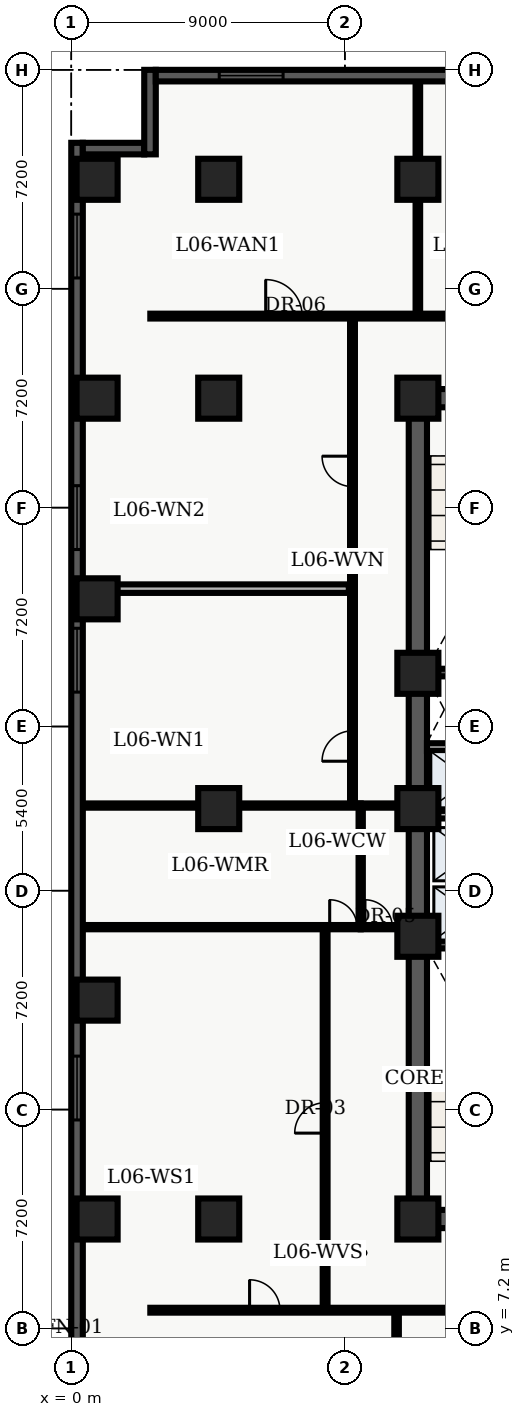
"""IFC4 building model, lengths in metres.
Left out: names, types, materials, properties, quantities, classifications, styles, units other than length and angle.
Written with IfcOpenShell. Run it as: python <this file> out.ifc"""

import sys

from ifc_helpers import new_model, entity, si_unit, converted_unit, direction, frame, origin_with_axes, origin_2d_with_axis, place, context, subcontext, project, spatial, polyline, rectangle, outline, extrude, element, fill, save


model = new_model("IFC4")
c1 = context("Model", 3, precision=1e-05, world=origin_with_axes(), true_north=direction((0.0, 1.0)))
c2 = subcontext(c1, "Body", "Model", "MODEL_VIEW")
j1 = project(units=[si_unit("LENGTHUNIT", "METRE"), converted_unit("PLANEANGLEUNIT", "DEGREE", entity("IfcPlaneAngleMeasure", 0.017), si_unit("PLANEANGLEUNIT", "RADIAN"), dimensions=[0, 0, 0, 0, 0, 0, 0])], contexts=[c1])
p1 = place(None, origin_with_axes())
s1 = spatial("IfcSite", under=j1, at=p1, CompositionType="ELEMENT")
p2 = place(p1, origin_with_axes())
s2 = spatial("IfcBuilding", under=s1, at=p2, CompositionType="ELEMENT")
p3 = place(p2, frame((0.0, 0.0, 28.8), z_axis=(0.0, 0.0, 1.0), x_axis=(1.0, 0.0, 0.0)))
s3 = spatial("IfcBuildingStorey", under=s2, at=p3, CompositionType="ELEMENT", Elevation=28.8)
p4 = place(p3, frame((11.4, 10.8, 0.0), z_axis=(0.0, 0.0, 1.0), x_axis=(0.0, 1.0, 0.0)))
e1 = element("IfcWall", 1, at=p4, inside=s3, PredefinedType="SHEAR", context=c2, shape_type="SweptSolid", body=[
    extrude(outline(polyline([(0.0, -0.3), (27.0, -0.3), (27.0, 0.3), (0.0, 0.3), (0.0, -0.3)])), origin_with_axes(), (0.0, 0.0, 1.0), 3.66),
])
p5 = place(p3, frame((11.4, 10.8, 0.0), z_axis=(0.0, 0.0, 1.0), x_axis=(1.0, 0.0, 0.0)))
e2 = element("IfcWall", 2, at=p5, inside=s3, PredefinedType="SHEAR", context=c2, shape_type="SweptSolid", body=[
    extrude(outline(polyline([(0.0, -0.3), (7.2, -0.3), (7.2, 0.3), (0.0, 0.3), (0.0, -0.3)])), origin_with_axes(), (0.0, 0.0, 1.0), 3.66),
])
p6 = place(p5, frame((2.625, 0.0, 0.0), z_axis=(0.0, 0.0, 1.0), x_axis=(1.0, 0.0, 0.0)))
e3 = element("IfcOpeningElement", 3, at=p6, cuts=e2, PredefinedType="OPENING", context=c2, shape_type="SweptSolid", body=[
    extrude(rectangle(XDim=1.05, YDim=0.62, at=origin_2d_with_axis()), origin_with_axes(), (0.0, 0.0, 1.0), 2.15),
])
p7 = place(p3, frame((11.4, 37.8, 0.0), z_axis=(0.0, 0.0, 1.0), x_axis=(1.0, 0.0, 0.0)))
e4 = element("IfcWall", 4, at=p7, inside=s3, PredefinedType="SHEAR", context=c2, shape_type="SweptSolid", body=[
    extrude(outline(polyline([(0.0, -0.3), (7.2, -0.3), (7.2, 0.3), (0.0, 0.3), (0.0, -0.3)])), origin_with_axes(), (0.0, 0.0, 1.0), 3.66),
])
p8 = place(p7, frame((2.625, 0.0, 0.0), z_axis=(0.0, 0.0, 1.0), x_axis=(1.0, 0.0, 0.0)))
e5 = element("IfcOpeningElement", 5, at=p8, cuts=e4, PredefinedType="OPENING", context=c2, shape_type="SweptSolid", body=[
    extrude(rectangle(XDim=1.05, YDim=0.62, at=origin_2d_with_axis()), origin_with_axes(), (0.0, 0.0, 1.0), 2.15),
])
for number, where, z_axis, x_axis in (
    (6, (11.7, 19.825, 0.0), (0.0, 0.0, 1.0), (1.0, 0.0, 0.0)),
    (7, (11.7, 28.775, 0.0), (0.0, 0.0, 1.0), (1.0, 0.0, 0.0)),
):
    element("IfcWall", number, at=place(p3, frame(where, z_axis=z_axis, x_axis=x_axis)), inside=s3, PredefinedType="SHEAR", context=c2, shape_type="SweptSolid", body=[
        extrude(outline(polyline([(0.0, -0.125), (6.6, -0.125), (6.6, 0.125), (0.0, 0.125), (0.0, -0.125)])), origin_with_axes(), (0.0, 0.0, 1.0), 3.66),
    ])
p9 = place(p3, frame((11.7, 24.1, 0.0), z_axis=(0.0, 0.0, 1.0), x_axis=(1.0, 0.0, 0.0)))
e8 = element("IfcWall", 8, at=p9, inside=s3, PredefinedType="SOLIDWALL", context=c2, shape_type="SweptSolid", body=[
    extrude(outline(polyline([(0.0, -0.125), (6.6, -0.125), (6.6, 0.125), (0.0, 0.125), (0.0, -0.125)])), origin_with_axes(), (0.0, 0.0, 1.0), 2.7),
])
p10 = place(p9, frame((3.75, 0.0, 0.0), z_axis=(0.0, 0.0, 1.0), x_axis=(1.0, 0.0, 0.0)))
e9 = element("IfcOpeningElement", 9, at=p10, cuts=e8, PredefinedType="OPENING", context=c2, shape_type="SweptSolid", body=[
    extrude(rectangle(XDim=0.9, YDim=0.27, at=origin_2d_with_axis()), origin_with_axes(), (0.0, 0.0, 1.0), 2.15),
])
p11 = place(p3, frame((11.7, 26.325, 0.0), z_axis=(0.0, 0.0, 1.0), x_axis=(1.0, 0.0, 0.0)))
e10 = element("IfcWall", 10, at=p11, inside=s3, PredefinedType="SOLIDWALL", context=c2, shape_type="SweptSolid", body=[
    extrude(outline(polyline([(0.0, -0.125), (6.6, -0.125), (6.6, 0.125), (0.0, 0.125), (0.0, -0.125)])), origin_with_axes(), (0.0, 0.0, 1.0), 2.7),
])
p12 = place(p11, frame((3.5, 0.0, 0.0), z_axis=(0.0, 0.0, 1.0), x_axis=(1.0, 0.0, 0.0)))
e11 = element("IfcOpeningElement", 11, at=p12, cuts=e10, PredefinedType="OPENING", context=c2, shape_type="SweptSolid", body=[
    extrude(rectangle(XDim=0.9, YDim=0.27, at=origin_2d_with_axis()), origin_with_axes(), (0.0, 0.0, 1.0), 2.15),
])
for number, where, z_axis, x_axis in (
    (12, (11.4, 10.8, 0.0), (0.0, 0.0, 1.0), (1.0, 0.0, 0.0)),
    (13, (11.4, 20.1, 0.0), (0.0, 0.0, 1.0), (1.0, 0.0, 0.0)),
    (14, (11.4, 24.3, 0.0), (0.0, 0.0, 1.0), (1.0, 0.0, 0.0)),
    (15, (11.4, 28.75, 0.0), (0.0, 0.0, 1.0), (1.0, 0.0, 0.0)),
    (16, (11.4, 37.8, 0.0), (0.0, 0.0, 1.0), (1.0, 0.0, 0.0)),
    (17, (11.4, 45.0, 0.0), (0.0, 0.0, 1.0), (1.0, 0.0, 0.0)),
    (18, (4.85, 10.8, 0.0), (0.0, 0.0, 1.0), (1.0, 0.0, 0.0)),
    (19, (4.85, 24.3, 0.0), (0.0, 0.0, 1.0), (1.0, 0.0, 0.0)),
    (20, (4.85, 37.8, 0.0), (0.0, 0.0, 1.0), (1.0, 0.0, 0.0)),
    (21, (4.85, 45.0, 0.0), (0.0, 0.0, 1.0), (1.0, 0.0, 0.0)),
    (22, (0.85, 10.8, 0.0), (0.0, 0.0, 1.0), (1.0, 0.0, 0.0)),
    (23, (0.85, 18.0, 0.0), (0.0, 0.0, 1.0), (1.0, 0.0, 0.0)),
    (24, (0.85, 31.2, 0.0), (0.0, 0.0, 1.0), (1.0, 0.0, 0.0)),
    (25, (0.85, 37.8, 0.0), (0.0, 0.0, 1.0), (1.0, 0.0, 0.0)),
    (26, (0.85, 45.0, 0.0), (0.0, 0.0, 1.0), (1.0, 0.0, 0.0)),
):
    element("IfcColumn", number, at=place(p3, frame(where, z_axis=z_axis, x_axis=x_axis)), inside=s3, PredefinedType="COLUMN", context=c2, shape_type="SweptSolid", body=[
        extrude(rectangle(XDim=1.35, YDim=1.35, at=origin_2d_with_axis()), origin_with_axes(), (0.0, 0.0, 1.0), 3.9),
    ])
p13 = place(p3, frame((9.52, 20.4, 0.0), z_axis=(0.0, 0.0, 1.0), x_axis=(0.0, 1.0, 0.0)))
e27 = element("IfcWall", 27, at=p13, inside=s3, PredefinedType="PARTITIONING", context=c2, shape_type="SweptSolid", body=[
    extrude(outline(polyline([(0.0, -0.07), (4.0, -0.07), (4.0, 0.07), (0.0, 0.07), (0.0, -0.07)])), origin_with_axes(), (0.0, 0.0, 1.0), 2.7),
])
p14 = place(p3, frame((9.52, 20.4, 0.0), z_axis=(0.0, 0.0, 1.0), x_axis=(1.0, 0.0, 0.0)))
e28 = element("IfcWall", 28, at=p14, inside=s3, PredefinedType="PARTITIONING", context=c2, shape_type="SweptSolid", body=[
    extrude(outline(polyline([(0.0, -0.07), (1.58, -0.07), (1.58, 0.07), (0.0, 0.07), (0.0, -0.07)])), origin_with_axes(), (0.0, 0.0, 1.0), 2.7),
])
p15 = place(p14, frame((0.59, 0.0, 0.0), z_axis=(0.0, 0.0, 1.0), x_axis=(1.0, 0.0, 0.0)))
e29 = element("IfcOpeningElement", 29, at=p15, cuts=e28, PredefinedType="OPENING", context=c2, shape_type="SweptSolid", body=[
    extrude(rectangle(XDim=0.9, YDim=0.16, at=origin_2d_with_axis()), origin_with_axes(), (0.0, 0.0, 1.0), 2.15),
])
p16 = place(p3, frame((9.52, 24.4, 0.0), z_axis=(0.0, 0.0, 1.0), x_axis=(1.0, 0.0, 0.0)))
e30 = element("IfcWall", 30, at=p16, inside=s3, PredefinedType="PARTITIONING", context=c2, shape_type="SweptSolid", body=[
    extrude(outline(polyline([(0.0, -0.07), (1.58, -0.07), (1.58, 0.07), (0.0, 0.07), (0.0, -0.07)])), origin_with_axes(), (0.0, 0.0, 1.0), 2.7),
])
p17 = place(p3, frame((2.6, 7.8, 0.0), z_axis=(0.0, 0.0, 1.0), x_axis=(1.0, 0.0, 0.0)))
e31 = element("IfcWall", 31, at=p17, inside=s3, PredefinedType="PARTITIONING", context=c2, shape_type="SweptSolid", body=[
    extrude(outline(polyline([(0.0, -0.08), (18.55, -0.08), (18.55, 0.08), (0.0, 0.08), (0.0, -0.08)])), origin_with_axes(), (0.0, 0.0, 1.0), 2.7),
])
p18 = place(p17, frame((3.765, 0.0, 0.0), z_axis=(0.0, 0.0, 1.0), x_axis=(1.0, 0.0, 0.0)))
e32 = element("IfcOpeningElement", 32, at=p18, cuts=e31, PredefinedType="OPENING", context=c2, shape_type="SweptSolid", body=[
    extrude(rectangle(XDim=1.0, YDim=0.18, at=origin_2d_with_axis()), origin_with_axes(), (0.0, 0.0, 1.0), 2.15),
])
p19 = place(p17, frame((13.3, 0.0, 0.0), z_axis=(0.0, 0.0, 1.0), x_axis=(1.0, 0.0, 0.0)))
e33 = element("IfcOpeningElement", 33, at=p19, cuts=e31, PredefinedType="OPENING", context=c2, shape_type="SweptSolid", body=[
    extrude(rectangle(XDim=1.0, YDim=0.18, at=origin_2d_with_axis()), origin_with_axes(), (0.0, 0.0, 1.0), 2.15),
])
p20 = place(p3, frame((2.6, 40.5, 0.0), z_axis=(0.0, 0.0, 1.0), x_axis=(1.0, 0.0, 0.0)))
e34 = element("IfcWall", 34, at=p20, inside=s3, PredefinedType="PARTITIONING", context=c2, shape_type="SweptSolid", body=[
    extrude(outline(polyline([(0.0, -0.08), (18.65, -0.08), (18.65, 0.08), (0.0, 0.08), (0.0, -0.08)])), origin_with_axes(), (0.0, 0.0, 1.0), 2.7),
])
p21 = place(p20, frame((4.395, 0.0, 0.0), z_axis=(0.0, 0.0, 1.0), x_axis=(1.0, 0.0, 0.0)))
e35 = element("IfcOpeningElement", 35, at=p21, cuts=e34, PredefinedType="OPENING", context=c2, shape_type="SweptSolid", body=[
    extrude(rectangle(XDim=1.2, YDim=0.18, at=origin_2d_with_axis()), origin_with_axes(), (0.0, 0.0, 1.0), 2.2),
])
p22 = place(p20, frame((12.61, 0.0, 0.0), z_axis=(0.0, 0.0, 1.0), x_axis=(1.0, 0.0, 0.0)))
e36 = element("IfcOpeningElement", 36, at=p22, cuts=e34, PredefinedType="OPENING", context=c2, shape_type="SweptSolid", body=[
    extrude(rectangle(XDim=1.0, YDim=0.18, at=origin_2d_with_axis()), origin_with_axes(), (0.0, 0.0, 1.0), 2.15),
])
p23 = place(p3, frame((8.35, 7.8, 0.0), z_axis=(0.0, 0.0, 1.0), x_axis=(0.0, 1.0, 0.0)))
e37 = element("IfcWall", 37, at=p23, inside=s3, PredefinedType="PARTITIONING", context=c2, shape_type="SweptSolid", body=[
    extrude(outline(polyline([(0.0, -0.08), (12.6, -0.08), (12.6, 0.08), (0.0, 0.08), (0.0, -0.08)])), origin_with_axes(), (0.0, 0.0, 1.0), 2.7),
])
p24 = place(p23, frame((6.325, 0.0, 0.0), z_axis=(0.0, 0.0, 1.0), x_axis=(1.0, 0.0, 0.0)))
e38 = element("IfcOpeningElement", 38, at=p24, cuts=e37, PredefinedType="OPENING", context=c2, shape_type="SweptSolid", body=[
    extrude(rectangle(XDim=1.0, YDim=0.18, at=origin_2d_with_axis()), origin_with_axes(), (0.0, 0.0, 1.0), 2.15),
])
p25 = place(p3, frame((9.25, 24.4, 0.0), z_axis=(0.0, 0.0, 1.0), x_axis=(0.0, 1.0, 0.0)))
e39 = element("IfcWall", 39, at=p25, inside=s3, PredefinedType="PARTITIONING", context=c2, shape_type="SweptSolid", body=[
    extrude(outline(polyline([(0.0, -0.08), (16.1, -0.08), (16.1, 0.08), (0.0, 0.08), (0.0, -0.08)])), origin_with_axes(), (0.0, 0.0, 1.0), 2.7),
])
p26 = place(p25, frame((1.958, 0.0, 0.0), z_axis=(0.0, 0.0, 1.0), x_axis=(1.0, 0.0, 0.0)))
e40 = element("IfcOpeningElement", 40, at=p26, cuts=e39, PredefinedType="OPENING", context=c2, shape_type="SweptSolid", body=[
    extrude(rectangle(XDim=1.0, YDim=0.18, at=origin_2d_with_axis()), origin_with_axes(), (0.0, 0.0, 1.0), 2.15),
])
p27 = place(p25, frame((10.992, 0.0, 0.0), z_axis=(0.0, 0.0, 1.0), x_axis=(1.0, 0.0, 0.0)))
e41 = element("IfcOpeningElement", 41, at=p27, cuts=e39, PredefinedType="OPENING", context=c2, shape_type="SweptSolid", body=[
    extrude(rectangle(XDim=1.0, YDim=0.18, at=origin_2d_with_axis()), origin_with_axes(), (0.0, 0.0, 1.0), 2.15),
])
p28 = place(p3, frame((0.36, 20.4, 0.0), z_axis=(0.0, 0.0, 1.0), x_axis=(1.0, 0.0, 0.0)))
e42 = element("IfcWall", 42, at=p28, inside=s3, PredefinedType="PARTITIONING", context=c2, shape_type="SweptSolid", body=[
    extrude(outline(polyline([(0.0, -0.07), (9.16, -0.07), (9.16, 0.07), (0.0, 0.07), (0.0, -0.07)])), origin_with_axes(), (0.0, 0.0, 1.0), 2.7),
])
p29 = place(p28, frame((8.59, 0.0, 0.0), z_axis=(0.0, 0.0, 1.0), x_axis=(1.0, 0.0, 0.0)))
e43 = element("IfcOpeningElement", 43, at=p29, cuts=e42, PredefinedType="OPENING", context=c2, shape_type="SweptSolid", body=[
    extrude(rectangle(XDim=0.9, YDim=0.16, at=origin_2d_with_axis()), origin_with_axes(), (0.0, 0.0, 1.0), 2.15),
])
p30 = place(p3, frame((0.36, 24.4, 0.0), z_axis=(0.0, 0.0, 1.0), x_axis=(1.0, 0.0, 0.0)))
e44 = element("IfcWall", 44, at=p30, inside=s3, PredefinedType="PARTITIONING", context=c2, shape_type="SweptSolid", body=[
    extrude(outline(polyline([(0.0, -0.07), (9.16, -0.07), (9.16, 0.07), (0.0, 0.07), (0.0, -0.07)])), origin_with_axes(), (0.0, 0.0, 1.0), 2.7),
])
p31 = place(p3, frame((0.375, 31.535, 0.0), z_axis=(0.0, 0.0, 1.0), x_axis=(1.0, 0.0, 0.0)))
e45 = element("IfcWall", 45, at=p31, inside=s3, PredefinedType="PARTITIONING", context=c2, shape_type="SweptSolid", body=[
    extrude(outline(polyline([(0.0, -0.14), (8.755, -0.14), (8.755, 0.14), (0.0, 0.14), (0.0, -0.14)])), origin_with_axes(), (0.0, 0.0, 1.0), 2.7),
])
p32 = place(p3, frame((10.7, 0.36, 0.0), z_axis=(0.0, 0.0, 1.0), x_axis=(0.0, 1.0, 0.0)))
e46 = element("IfcWall", 46, at=p32, inside=s3, PredefinedType="PARTITIONING", context=c2, shape_type="SweptSolid", body=[
    extrude(outline(polyline([(0.0, -0.075), (7.34, -0.075), (7.34, 0.075), (0.0, 0.075), (0.0, -0.075)])), origin_with_axes(), (0.0, 0.0, 1.0), 2.7),
])
p33 = place(p3, frame((11.4, 40.6, 0.0), z_axis=(0.0, 0.0, 1.0), x_axis=(0.0, 1.0, 0.0)))
e47 = element("IfcWall", 47, at=p33, inside=s3, PredefinedType="PARTITIONING", context=c2, shape_type="SweptSolid", body=[
    extrude(outline(polyline([(0.0, -0.075), (7.64, -0.075), (7.64, 0.075), (0.0, 0.075), (0.0, -0.075)])), origin_with_axes(), (0.0, 0.0, 1.0), 2.7),
])
p34 = place(p3, frame((0.19, 2.78, 0.0), z_axis=(0.0, 0.0, 1.0), x_axis=(0.0, 1.0, 0.0)))
e48 = element("IfcWall", 48, at=p34, inside=s3, PredefinedType="SOLIDWALL", context=c2, shape_type="SweptSolid", body=[
    extrude(outline(polyline([(0.0, -0.19), (43.42, -0.19), (43.42, 0.19), (0.0, 0.19), (0.0, -0.19)])), origin_with_axes(), (0.0, 0.0, 1.0), 3.66),
])
p35 = place(p34, frame((2.946, 0.0, 0.45), z_axis=(0.0, 0.0, 1.0), x_axis=(1.0, 0.0, 0.0)))
e49 = element("IfcOpeningElement", 49, at=p35, cuts=e48, PredefinedType="OPENING", context=c2, shape_type="SweptSolid", body=[
    extrude(rectangle(XDim=2.1, YDim=0.4, at=origin_2d_with_axis()), origin_with_axes(), (0.0, 0.0, 1.0), 2.2),
])
p36 = place(p34, frame((12.328, 0.0, 0.45), z_axis=(0.0, 0.0, 1.0), x_axis=(1.0, 0.0, 0.0)))
e50 = element("IfcOpeningElement", 50, at=p36, cuts=e48, PredefinedType="OPENING", context=c2, shape_type="SweptSolid", body=[
    extrude(rectangle(XDim=2.1, YDim=0.4, at=origin_2d_with_axis()), origin_with_axes(), (0.0, 0.0, 1.0), 2.2),
])
p37 = place(p34, frame((26.401, 0.0, 0.45), z_axis=(0.0, 0.0, 1.0), x_axis=(1.0, 0.0, 0.0)))
e51 = element("IfcOpeningElement", 51, at=p37, cuts=e48, PredefinedType="OPENING", context=c2, shape_type="SweptSolid", body=[
    extrude(rectangle(XDim=2.1, YDim=0.4, at=origin_2d_with_axis()), origin_with_axes(), (0.0, 0.0, 1.0), 2.2),
])
p38 = place(p34, frame((31.092, 0.0, 0.45), z_axis=(0.0, 0.0, 1.0), x_axis=(1.0, 0.0, 0.0)))
e52 = element("IfcOpeningElement", 52, at=p38, cuts=e48, PredefinedType="OPENING", context=c2, shape_type="SweptSolid", body=[
    extrude(rectangle(XDim=2.1, YDim=0.4, at=origin_2d_with_axis()), origin_with_axes(), (0.0, 0.0, 1.0), 2.2),
])
p39 = place(p34, frame((40.024, 0.0, 0.45), z_axis=(0.0, 0.0, 1.0), x_axis=(1.0, 0.0, 0.0)))
e53 = element("IfcOpeningElement", 53, at=p39, cuts=e48, PredefinedType="OPENING", context=c2, shape_type="SweptSolid", body=[
    extrude(rectangle(XDim=2.1, YDim=0.4, at=origin_2d_with_axis()), origin_with_axes(), (0.0, 0.0, 1.0), 2.2),
])
p40 = place(p3, frame((0.38, 46.01, 0.0), z_axis=(0.0, 0.0, 1.0), x_axis=(1.0, 0.0, 0.0)))
e54 = element("IfcWall", 54, at=p40, inside=s3, PredefinedType="SOLIDWALL", context=c2, shape_type="SweptSolid", body=[
    extrude(outline(polyline([(0.0, -0.19), (2.02, -0.19), (2.02, 0.19), (0.0, 0.19), (0.0, -0.19)])), origin_with_axes(), (0.0, 0.0, 1.0), 3.66),
])
p41 = place(p3, frame((2.59, 45.82, 0.0), z_axis=(0.0, 0.0, 1.0), x_axis=(0.0, 1.0, 0.0)))
e55 = element("IfcWall", 55, at=p41, inside=s3, PredefinedType="SOLIDWALL", context=c2, shape_type="SweptSolid", body=[
    extrude(outline(polyline([(0.0, -0.19), (2.78, -0.19), (2.78, 0.19), (0.0, 0.19), (0.0, -0.19)])), origin_with_axes(), (0.0, 0.0, 1.0), 3.66),
])
p42 = place(p3, frame((2.78, 48.41, 0.0), z_axis=(0.0, 0.0, 1.0), x_axis=(1.0, 0.0, 0.0)))
e56 = element("IfcWall", 56, at=p42, inside=s3, PredefinedType="SOLIDWALL", context=c2, shape_type="SweptSolid", body=[
    extrude(outline(polyline([(0.0, -0.19), (16.42, -0.19), (16.42, 0.19), (0.0, 0.19), (0.0, -0.19)])), origin_with_axes(), (0.0, 0.0, 1.0), 3.66),
])
p43 = place(p42, frame((3.137, 0.0, 0.45), z_axis=(0.0, 0.0, 1.0), x_axis=(1.0, 0.0, 0.0)))
e57 = element("IfcOpeningElement", 57, at=p43, cuts=e56, PredefinedType="OPENING", context=c2, shape_type="SweptSolid", body=[
    extrude(rectangle(XDim=2.1, YDim=0.4, at=origin_2d_with_axis()), origin_with_axes(), (0.0, 0.0, 1.0), 2.2),
])
p44 = place(p42, frame((13.283, 0.0, 0.45), z_axis=(0.0, 0.0, 1.0), x_axis=(1.0, 0.0, 0.0)))
e58 = element("IfcOpeningElement", 58, at=p44, cuts=e56, PredefinedType="OPENING", context=c2, shape_type="SweptSolid", body=[
    extrude(rectangle(XDim=2.1, YDim=0.4, at=origin_2d_with_axis()), origin_with_axes(), (0.0, 0.0, 1.0), 2.2),
])
p45 = place(p14, frame((0.59, 0.0, 0.0), z_axis=(0.0, 0.0, 1.0), x_axis=(1.0, 0.0, 0.0)))
e59 = element("IfcDoor", 59, at=p45, inside=s3, OperationType="SINGLE_SWING_LEFT", PredefinedType="DOOR", context=c2, shape_type="SweptSolid", body=[
    extrude(rectangle(XDim=0.9, YDim=0.084, at=origin_2d_with_axis()), origin_with_axes(), (0.0, 0.0, 1.0), 2.15),
])
fill(e29, e59)
p46 = place(p28, frame((8.59, 0.0, 0.0), z_axis=(0.0, 0.0, 1.0), x_axis=(1.0, 0.0, 0.0)))
e60 = element("IfcDoor", 60, at=p46, inside=s3, OperationType="SINGLE_SWING_LEFT", PredefinedType="DOOR", context=c2, shape_type="SweptSolid", body=[
    extrude(rectangle(XDim=0.9, YDim=0.084, at=origin_2d_with_axis()), origin_with_axes(), (0.0, 0.0, 1.0), 2.15),
])
fill(e43, e60)
p47 = place(p23, frame((6.325, 0.0, 0.0), z_axis=(0.0, 0.0, 1.0), x_axis=(1.0, 0.0, 0.0)))
e61 = element("IfcDoor", 61, at=p47, inside=s3, OperationType="SINGLE_SWING_LEFT", PredefinedType="DOOR", context=c2, shape_type="SweptSolid", body=[
    extrude(rectangle(XDim=1.0, YDim=0.09, at=origin_2d_with_axis()), origin_with_axes(), (0.0, 0.0, 1.0), 2.15),
])
fill(e38, e61)
p48 = place(p25, frame((1.958, 0.0, 0.0), z_axis=(0.0, 0.0, 1.0), x_axis=(1.0, 0.0, 0.0)))
e62 = element("IfcDoor", 62, at=p48, inside=s3, OperationType="SINGLE_SWING_LEFT", PredefinedType="DOOR", context=c2, shape_type="SweptSolid", body=[
    extrude(rectangle(XDim=1.0, YDim=0.09, at=origin_2d_with_axis()), origin_with_axes(), (0.0, 0.0, 1.0), 2.15),
])
fill(e40, e62)
p49 = place(p25, frame((10.992, 0.0, 0.0), z_axis=(0.0, 0.0, 1.0), x_axis=(1.0, 0.0, 0.0)))
e63 = element("IfcDoor", 63, at=p49, inside=s3, OperationType="SINGLE_SWING_RIGHT", PredefinedType="DOOR", context=c2, shape_type="SweptSolid", body=[
    extrude(rectangle(XDim=1.0, YDim=0.09, at=origin_2d_with_axis()), origin_with_axes(), (0.0, 0.0, 1.0), 2.15),
])
fill(e41, e63)
p50 = place(p17, frame((3.765, 0.0, 0.0), z_axis=(0.0, 0.0, 1.0), x_axis=(1.0, 0.0, 0.0)))
e64 = element("IfcDoor", 64, at=p50, inside=s3, OperationType="SINGLE_SWING_LEFT", PredefinedType="DOOR", context=c2, shape_type="SweptSolid", body=[
    extrude(rectangle(XDim=1.0, YDim=0.09, at=origin_2d_with_axis()), origin_with_axes(), (0.0, 0.0, 1.0), 2.15),
])
fill(e32, e64)
p51 = place(p20, frame((4.395, 0.0, 0.0), z_axis=(0.0, 0.0, 1.0), x_axis=(1.0, 0.0, 0.0)))
e65 = element("IfcDoor", 65, at=p51, inside=s3, OperationType="SINGLE_SWING_LEFT", PredefinedType="DOOR", context=c2, shape_type="SweptSolid", body=[
    extrude(rectangle(XDim=1.2, YDim=0.09, at=origin_2d_with_axis()), origin_with_axes(), (0.0, 0.0, 1.0), 2.2),
])
fill(e35, e65)
p52 = place(p34, frame((12.328, 0.0, 0.45), z_axis=(0.0, 0.0, 1.0), x_axis=(1.0, 0.0, 0.0)))
e66 = element("IfcWindow", 66, at=p52, inside=s3, PredefinedType="WINDOW", context=c2, shape_type="SweptSolid", body=[
    extrude(rectangle(XDim=2.1, YDim=0.09, at=origin_2d_with_axis()), origin_with_axes(), (0.0, 0.0, 1.0), 2.2),
])
fill(e50, e66)
p53 = place(p34, frame((26.401, 0.0, 0.45), z_axis=(0.0, 0.0, 1.0), x_axis=(1.0, 0.0, 0.0)))
e67 = element("IfcWindow", 67, at=p53, inside=s3, PredefinedType="WINDOW", context=c2, shape_type="SweptSolid", body=[
    extrude(rectangle(XDim=2.1, YDim=0.09, at=origin_2d_with_axis()), origin_with_axes(), (0.0, 0.0, 1.0), 2.2),
])
fill(e51, e67)
p54 = place(p34, frame((31.092, 0.0, 0.45), z_axis=(0.0, 0.0, 1.0), x_axis=(1.0, 0.0, 0.0)))
e68 = element("IfcWindow", 68, at=p54, inside=s3, PredefinedType="WINDOW", context=c2, shape_type="SweptSolid", body=[
    extrude(rectangle(XDim=2.1, YDim=0.09, at=origin_2d_with_axis()), origin_with_axes(), (0.0, 0.0, 1.0), 2.2),
])
fill(e52, e68)
p55 = place(p34, frame((40.024, 0.0, 0.45), z_axis=(0.0, 0.0, 1.0), x_axis=(1.0, 0.0, 0.0)))
e69 = element("IfcWindow", 69, at=p55, inside=s3, PredefinedType="WINDOW", context=c2, shape_type="SweptSolid", body=[
    extrude(rectangle(XDim=2.1, YDim=0.09, at=origin_2d_with_axis()), origin_with_axes(), (0.0, 0.0, 1.0), 2.2),
])
fill(e53, e69)
p56 = place(p42, frame((3.137, 0.0, 0.45), z_axis=(0.0, 0.0, 1.0), x_axis=(1.0, 0.0, 0.0)))
e70 = element("IfcWindow", 70, at=p56, inside=s3, PredefinedType="WINDOW", context=c2, shape_type="SweptSolid", body=[
    extrude(rectangle(XDim=2.1, YDim=0.09, at=origin_2d_with_axis()), origin_with_axes(), (0.0, 0.0, 1.0), 2.2),
])
fill(e57, e70)
save(model, sys.argv[1])
